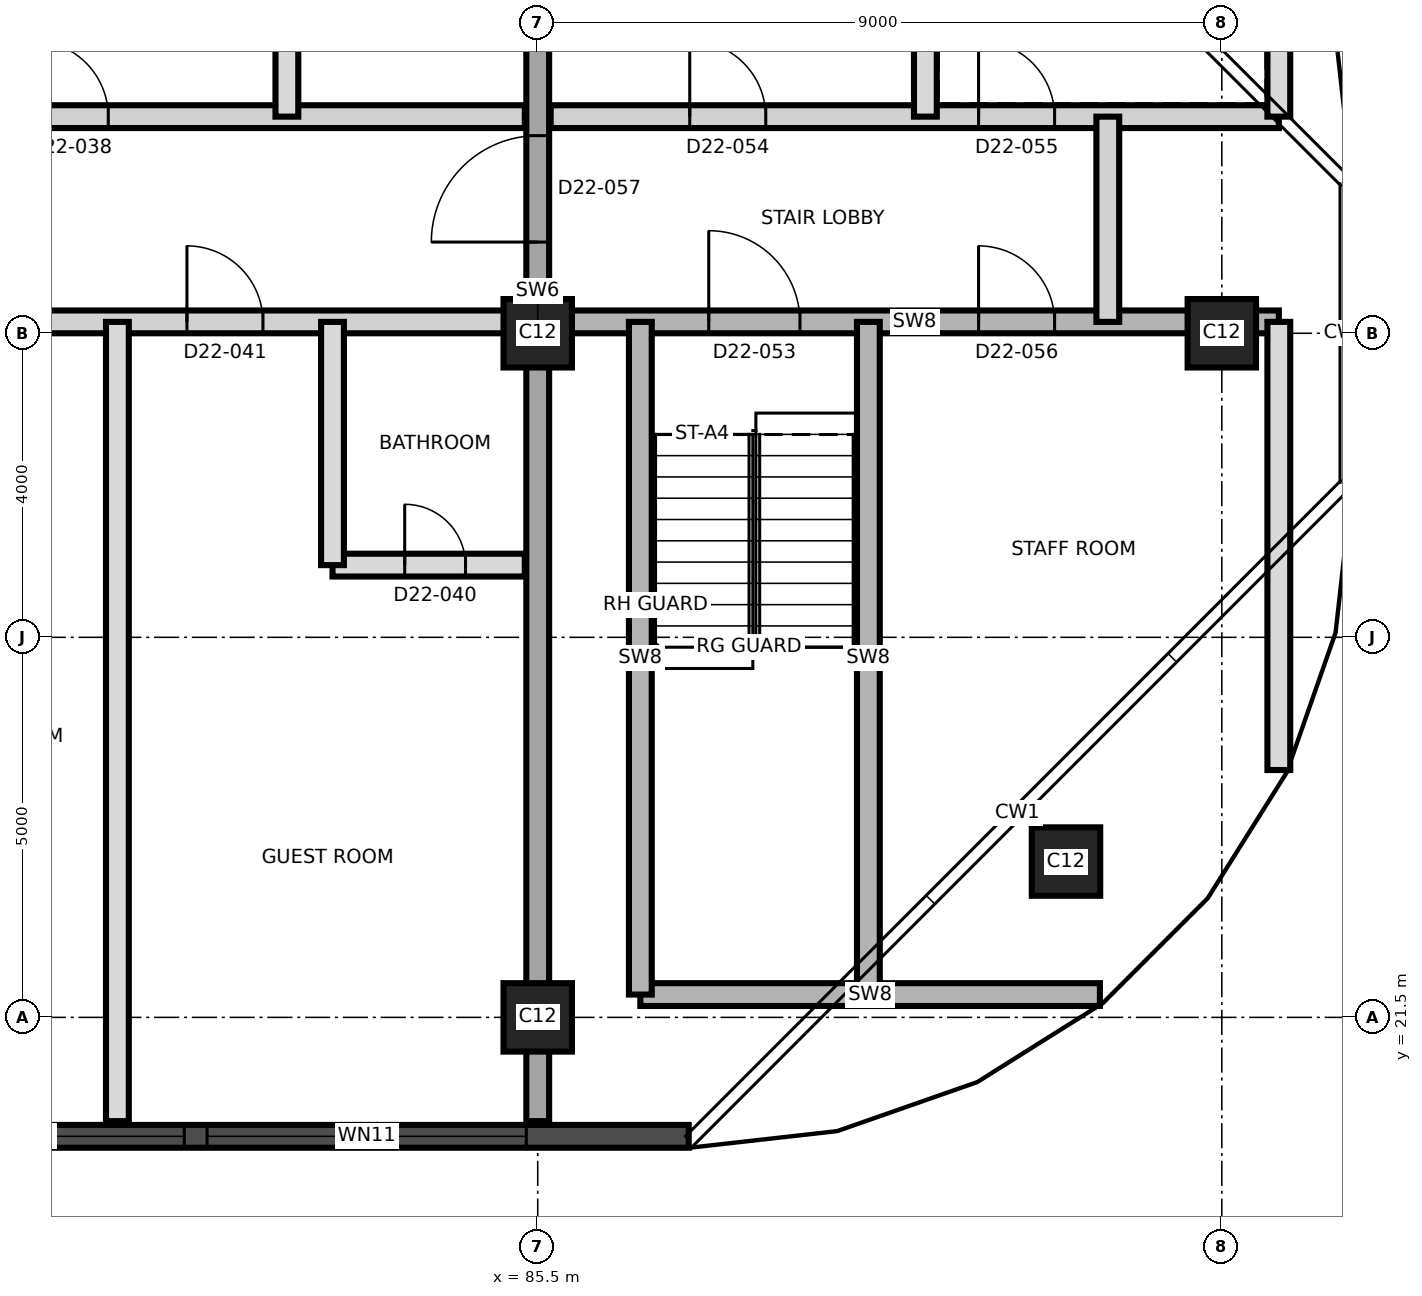
"""IFC4 building model, lengths in metres.
Left out: names, types, materials, properties, quantities, classifications, styles, units other than length and angle.
Written with IfcOpenShell. Run it as: python <this file> out.ifc"""

import sys

from ifc_helpers import new_model, si_unit, direction, frame, frame_2d, origin, origin_2d, place, context, subcontext, project, spatial, rectangle, extrude, element, fill, save


model = new_model("IFC4")
c1 = context("Model", 3, precision=1e-05, world=origin(), true_north=direction((0.0, 1.0)))
c2 = subcontext(c1, "Body", "Model", "MODEL_VIEW")
j1 = project(units=[si_unit("LENGTHUNIT", "METRE"), si_unit("PLANEANGLEUNIT", "RADIAN")], contexts=[c1])
p1 = place(None, origin())
s1 = spatial("IfcSite", under=j1, at=p1, CompositionType="ELEMENT")
p2 = place(p1, origin())
s2 = spatial("IfcBuilding", under=s1, at=p2, CompositionType="ELEMENT")
p3 = place(p2, frame((0.0, 0.0, 199.5)))
s3 = spatial("IfcBuildingStorey", under=s2, at=p3, CompositionType="ELEMENT", Elevation=199.5)
for number, where, z_axis, x_axis in (
    (1, (85.5, 21.5, 0.0), (0.0, 0.0, 1.0), (1.0, 0.0, 0.0)),
    (2, (92.45, 23.55, 0.0), (0.0, 0.0, 1.0), (1.0, 0.0, 0.0)),
    (3, (85.5, 30.5, 0.0), (0.0, 0.0, 1.0), (1.0, 0.0, 0.0)),
    (4, (94.5, 30.5, 0.0), (0.0, 0.0, 1.0), (1.0, 0.0, 0.0)),
):
    element("IfcColumn", number, at=place(p3, frame(where, z_axis=z_axis, x_axis=x_axis)), inside=s3, PredefinedType="COLUMN", context=c2, shape_type="SweptSolid", body=[
        extrude(rectangle(XDim=0.9, YDim=0.9, at=origin_2d()), origin(), (0.0, 0.0, 1.0), 3.7),
    ])
p4 = place(p3, frame((85.5, 20.135, 0.0), z_axis=(0.0, 0.0, 1.0), x_axis=(0.0, 1.0, 0.0)))
e5 = element("IfcWall", 5, at=p4, inside=s3, PredefinedType="SHEAR", context=c2, shape_type="SweptSolid", body=[
    extrude(rectangle(XDim=20.73, YDim=0.3, at=frame_2d((10.365, 0.0))), origin(), (0.0, 0.0, 1.0), 3.7),
])
p5 = place(p4, frame((11.565, 0.0, 0.0)))
e6 = element("IfcOpeningElement", 6, at=p5, cuts=e5, PredefinedType="OPENING", context=c2, shape_type="SweptSolid", body=[
    extrude(rectangle(XDim=1.4, YDim=2.1, at=frame_2d((0.7, 1.05))), frame((0.0, 0.16, 0.0), z_axis=(0.0, -1.0, 0.0), x_axis=(1.0, 0.0, 0.0)), (0.0, 0.0, 1.0), 0.32),
])
p6 = place(p3, frame((44.01, 19.935, 0.0), z_axis=(0.0, 0.0, 1.0), x_axis=(1.0, 0.0, 0.0)))
e7 = element("IfcWall", 7, at=p6, inside=s3, PredefinedType="SOLIDWALL", context=c2, shape_type="SweptSolid", body=[
    extrude(rectangle(XDim=43.477, YDim=0.3, at=frame_2d((21.738, 0.0))), origin(), (0.0, 0.0, 1.0), 3.4),
])
p7 = place(p6, frame((1.845, 0.0, 0.3)))
e8 = element("IfcOpeningElement", 8, at=p7, cuts=e7, PredefinedType="OPENING", context=c2, shape_type="SweptSolid", body=[
    extrude(rectangle(XDim=1.8, YDim=2.4, at=frame_2d((0.9, 1.2))), frame((0.0, 0.16, 0.0), z_axis=(0.0, -1.0, 0.0), x_axis=(1.0, 0.0, 0.0)), (0.0, 0.0, 1.0), 0.32),
])
p8 = place(p6, frame((5.64, 0.0, 0.9)))
e9 = element("IfcOpeningElement", 9, at=p8, cuts=e7, PredefinedType="OPENING", context=c2, shape_type="SweptSolid", body=[
    extrude(rectangle(XDim=4.2, YDim=1.5, at=frame_2d((2.1, 0.75))), frame((0.0, 0.16, 0.0), z_axis=(0.0, -1.0, 0.0), x_axis=(1.0, 0.0, 0.0)), (0.0, 0.0, 1.0), 0.32),
])
p9 = place(p6, frame((10.14, 0.0, 0.9)))
e10 = element("IfcOpeningElement", 10, at=p9, cuts=e7, PredefinedType="OPENING", context=c2, shape_type="SweptSolid", body=[
    extrude(rectangle(XDim=4.2, YDim=1.5, at=frame_2d((2.1, 0.75))), frame((0.0, 0.16, 0.0), z_axis=(0.0, -1.0, 0.0), x_axis=(1.0, 0.0, 0.0)), (0.0, 0.0, 1.0), 0.32),
])
p10 = place(p6, frame((14.64, 0.0, 0.9)))
e11 = element("IfcOpeningElement", 11, at=p10, cuts=e7, PredefinedType="OPENING", context=c2, shape_type="SweptSolid", body=[
    extrude(rectangle(XDim=4.2, YDim=1.5, at=frame_2d((2.1, 0.75))), frame((0.0, 0.16, 0.0), z_axis=(0.0, -1.0, 0.0), x_axis=(1.0, 0.0, 0.0)), (0.0, 0.0, 1.0), 0.32),
])
p11 = place(p6, frame((19.14, 0.0, 0.9)))
e12 = element("IfcOpeningElement", 12, at=p11, cuts=e7, PredefinedType="OPENING", context=c2, shape_type="SweptSolid", body=[
    extrude(rectangle(XDim=4.2, YDim=1.5, at=frame_2d((2.1, 0.75))), frame((0.0, 0.16, 0.0), z_axis=(0.0, -1.0, 0.0), x_axis=(1.0, 0.0, 0.0)), (0.0, 0.0, 1.0), 0.32),
])
p12 = place(p6, frame((23.64, 0.0, 0.9)))
e13 = element("IfcOpeningElement", 13, at=p12, cuts=e7, PredefinedType="OPENING", context=c2, shape_type="SweptSolid", body=[
    extrude(rectangle(XDim=4.2, YDim=1.5, at=frame_2d((2.1, 0.75))), frame((0.0, 0.16, 0.0), z_axis=(0.0, -1.0, 0.0), x_axis=(1.0, 0.0, 0.0)), (0.0, 0.0, 1.0), 0.32),
])
p13 = place(p6, frame((28.14, 0.0, 0.9)))
e14 = element("IfcOpeningElement", 14, at=p13, cuts=e7, PredefinedType="OPENING", context=c2, shape_type="SweptSolid", body=[
    extrude(rectangle(XDim=4.2, YDim=1.5, at=frame_2d((2.1, 0.75))), frame((0.0, 0.16, 0.0), z_axis=(0.0, -1.0, 0.0), x_axis=(1.0, 0.0, 0.0)), (0.0, 0.0, 1.0), 0.32),
])
p14 = place(p6, frame((32.64, 0.0, 0.9)))
e15 = element("IfcOpeningElement", 15, at=p14, cuts=e7, PredefinedType="OPENING", context=c2, shape_type="SweptSolid", body=[
    extrude(rectangle(XDim=4.2, YDim=1.5, at=frame_2d((2.1, 0.75))), frame((0.0, 0.16, 0.0), z_axis=(0.0, -1.0, 0.0), x_axis=(1.0, 0.0, 0.0)), (0.0, 0.0, 1.0), 0.32),
])
p15 = place(p6, frame((37.14, 0.0, 0.9)))
e16 = element("IfcOpeningElement", 16, at=p15, cuts=e7, PredefinedType="OPENING", context=c2, shape_type="SweptSolid", body=[
    extrude(rectangle(XDim=4.2, YDim=1.5, at=frame_2d((2.1, 0.75))), frame((0.0, 0.16, 0.0), z_axis=(0.0, -1.0, 0.0), x_axis=(1.0, 0.0, 0.0)), (0.0, 0.0, 1.0), 0.32),
])
p16 = place(p3, frame((86.85, 21.8, 0.0), z_axis=(0.0, 0.0, 1.0), x_axis=(1.0, 0.0, 0.0)))
e17 = element("IfcWall", 17, at=p16, inside=s3, PredefinedType="SHEAR", context=c2, shape_type="SweptSolid", body=[
    extrude(rectangle(XDim=6.046, YDim=0.3, at=frame_2d((3.023, 0.0))), origin(), (0.0, 0.0, 1.0), 3.4),
])
p17 = place(p3, frame((82.8, 27.45, 0.0), z_axis=(0.0, 0.0, 1.0), x_axis=(1.0, 0.0, 0.0)))
e18 = element("IfcWall", 18, at=p17, inside=s3, PredefinedType="PARTITIONING", context=c2, shape_type="SweptSolid", body=[
    extrude(rectangle(XDim=2.53, YDim=0.3, at=frame_2d((1.265, 0.0))), origin(), (0.0, 0.0, 1.0), 3.4),
])
p18 = place(p17, frame((0.95, 0.0, 0.0)))
e19 = element("IfcOpeningElement", 19, at=p18, cuts=e18, PredefinedType="OPENING", context=c2, shape_type="SweptSolid", body=[
    extrude(rectangle(XDim=0.8, YDim=2.1, at=frame_2d((0.4, 1.05))), frame((0.0, 0.16, 0.0), z_axis=(0.0, -1.0, 0.0), x_axis=(1.0, 0.0, 0.0)), (0.0, 0.0, 1.0), 0.32),
])
p19 = place(p3, frame((58.55, 30.65, 0.0), z_axis=(0.0, 0.0, 1.0), x_axis=(1.0, 0.0, 0.0)))
e20 = element("IfcWall", 20, at=p19, inside=s3, PredefinedType="PARTITIONING", context=c2, shape_type="SweptSolid", body=[
    extrude(rectangle(XDim=26.78, YDim=0.3, at=frame_2d((13.39, 0.0))), origin(), (0.0, 0.0, 1.0), 3.4),
])
p20 = place(p19, frame((1.65, 0.0, 0.0)))
e21 = element("IfcOpeningElement", 21, at=p20, cuts=e20, PredefinedType="OPENING", context=c2, shape_type="SweptSolid", body=[
    extrude(rectangle(XDim=1.2, YDim=2.1, at=frame_2d((0.6, 1.05))), frame((0.0, 0.16, 0.0), z_axis=(0.0, -1.0, 0.0), x_axis=(1.0, 0.0, 0.0)), (0.0, 0.0, 1.0), 0.32),
])
p21 = place(p19, frame((4.9, 0.0, 0.0)))
e22 = element("IfcOpeningElement", 22, at=p21, cuts=e20, PredefinedType="OPENING", context=c2, shape_type="SweptSolid", body=[
    extrude(rectangle(XDim=1.0, YDim=2.1, at=frame_2d((0.5, 1.05))), frame((0.0, 0.16, 0.0), z_axis=(0.0, -1.0, 0.0), x_axis=(1.0, 0.0, 0.0)), (0.0, 0.0, 1.0), 0.32),
])
p22 = place(p19, frame((10.085, 0.0, 0.0)))
e23 = element("IfcOpeningElement", 23, at=p22, cuts=e20, PredefinedType="OPENING", context=c2, shape_type="SweptSolid", body=[
    extrude(rectangle(XDim=1.2, YDim=2.1, at=frame_2d((0.6, 1.05))), frame((0.0, 0.16, 0.0), z_axis=(0.0, -1.0, 0.0), x_axis=(1.0, 0.0, 0.0)), (0.0, 0.0, 1.0), 0.32),
])
p23 = place(p19, frame((13.335, 0.0, 0.0)))
e24 = element("IfcOpeningElement", 24, at=p23, cuts=e20, PredefinedType="OPENING", context=c2, shape_type="SweptSolid", body=[
    extrude(rectangle(XDim=1.0, YDim=2.1, at=frame_2d((0.5, 1.05))), frame((0.0, 0.16, 0.0), z_axis=(0.0, -1.0, 0.0), x_axis=(1.0, 0.0, 0.0)), (0.0, 0.0, 1.0), 0.32),
])
p24 = place(p19, frame((19.085, 0.0, 0.0)))
e25 = element("IfcOpeningElement", 25, at=p24, cuts=e20, PredefinedType="OPENING", context=c2, shape_type="SweptSolid", body=[
    extrude(rectangle(XDim=1.2, YDim=2.1, at=frame_2d((0.6, 1.05))), frame((0.0, 0.16, 0.0), z_axis=(0.0, -1.0, 0.0), x_axis=(1.0, 0.0, 0.0)), (0.0, 0.0, 1.0), 0.32),
])
p25 = place(p19, frame((22.335, 0.0, 0.0)))
e26 = element("IfcOpeningElement", 26, at=p25, cuts=e20, PredefinedType="OPENING", context=c2, shape_type="SweptSolid", body=[
    extrude(rectangle(XDim=1.0, YDim=2.1, at=frame_2d((0.5, 1.05))), frame((0.0, 0.16, 0.0), z_axis=(0.0, -1.0, 0.0), x_axis=(1.0, 0.0, 0.0)), (0.0, 0.0, 1.0), 0.32),
])
p26 = place(p3, frame((85.67, 30.65, 0.0), z_axis=(0.0, 0.0, 1.0), x_axis=(1.0, 0.0, 0.0)))
e27 = element("IfcWall", 27, at=p26, inside=s3, PredefinedType="SHEAR", context=c2, shape_type="SweptSolid", body=[
    extrude(rectangle(XDim=9.58, YDim=0.3, at=frame_2d((4.79, 0.0))), origin(), (0.0, 0.0, 1.0), 3.4),
])
p27 = place(p26, frame((2.08, 0.0, 0.0)))
e28 = element("IfcOpeningElement", 28, at=p27, cuts=e27, PredefinedType="OPENING", context=c2, shape_type="SweptSolid", body=[
    extrude(rectangle(XDim=1.2, YDim=2.1, at=frame_2d((0.6, 1.05))), frame((0.0, 0.16, 0.0), z_axis=(0.0, -1.0, 0.0), x_axis=(1.0, 0.0, 0.0)), (0.0, 0.0, 1.0), 0.32),
])
p28 = place(p26, frame((5.63, 0.0, 0.0)))
e29 = element("IfcOpeningElement", 29, at=p28, cuts=e27, PredefinedType="OPENING", context=c2, shape_type="SweptSolid", body=[
    extrude(rectangle(XDim=1.0, YDim=2.1, at=frame_2d((0.5, 1.05))), frame((0.0, 0.16, 0.0), z_axis=(0.0, -1.0, 0.0), x_axis=(1.0, 0.0, 0.0)), (0.0, 0.0, 1.0), 0.32),
])
p29 = place(p3, frame((58.55, 33.35, 0.0), z_axis=(0.0, 0.0, 1.0), x_axis=(1.0, 0.0, 0.0)))
e30 = element("IfcWall", 30, at=p29, inside=s3, PredefinedType="PARTITIONING", context=c2, shape_type="SweptSolid", body=[
    extrude(rectangle(XDim=26.78, YDim=0.3, at=frame_2d((13.39, 0.0))), origin(), (0.0, 0.0, 1.0), 3.4),
])
p30 = place(p29, frame((1.1, 0.0, 0.0)))
e31 = element("IfcOpeningElement", 31, at=p30, cuts=e30, PredefinedType="OPENING", context=c2, shape_type="SweptSolid", body=[
    extrude(rectangle(XDim=1.0, YDim=2.1, at=frame_2d((0.5, 1.05))), frame((0.0, 0.16, 0.0), z_axis=(0.0, -1.0, 0.0), x_axis=(1.0, 0.0, 0.0)), (0.0, 0.0, 1.0), 0.32),
])
p31 = place(p29, frame((6.95, 0.0, 0.0)))
e32 = element("IfcOpeningElement", 32, at=p31, cuts=e30, PredefinedType="OPENING", context=c2, shape_type="SweptSolid", body=[
    extrude(rectangle(XDim=1.0, YDim=2.1, at=frame_2d((0.5, 1.05))), frame((0.0, 0.16, 0.0), z_axis=(0.0, -1.0, 0.0), x_axis=(1.0, 0.0, 0.0)), (0.0, 0.0, 1.0), 0.32),
])
p32 = place(p29, frame((14.6, 0.0, 0.0)))
e33 = element("IfcOpeningElement", 33, at=p32, cuts=e30, PredefinedType="OPENING", context=c2, shape_type="SweptSolid", body=[
    extrude(rectangle(XDim=1.0, YDim=2.4, at=frame_2d((0.5, 1.2))), frame((0.0, 0.16, 0.0), z_axis=(0.0, -1.0, 0.0), x_axis=(1.0, 0.0, 0.0)), (0.0, 0.0, 1.0), 0.32),
])
p33 = place(p29, frame((20.3, 0.0, 0.0)))
e34 = element("IfcOpeningElement", 34, at=p33, cuts=e30, PredefinedType="OPENING", context=c2, shape_type="SweptSolid", body=[
    extrude(rectangle(XDim=1.0, YDim=2.4, at=frame_2d((0.5, 1.2))), frame((0.0, 0.16, 0.0), z_axis=(0.0, -1.0, 0.0), x_axis=(1.0, 0.0, 0.0)), (0.0, 0.0, 1.0), 0.32),
])
p34 = place(p3, frame((85.67, 33.35, 0.0), z_axis=(0.0, 0.0, 1.0), x_axis=(1.0, 0.0, 0.0)))
e35 = element("IfcWall", 35, at=p34, inside=s3, PredefinedType="PARTITIONING", context=c2, shape_type="SweptSolid", body=[
    extrude(rectangle(XDim=9.58, YDim=0.3, at=frame_2d((4.79, 0.0))), origin(), (0.0, 0.0, 1.0), 3.4),
])
p35 = place(p34, frame((1.83, 0.0, 0.0)))
e36 = element("IfcOpeningElement", 36, at=p35, cuts=e35, PredefinedType="OPENING", context=c2, shape_type="SweptSolid", body=[
    extrude(rectangle(XDim=1.0, YDim=2.1, at=frame_2d((0.5, 1.05))), frame((0.0, 0.16, 0.0), z_axis=(0.0, -1.0, 0.0), x_axis=(1.0, 0.0, 0.0)), (0.0, 0.0, 1.0), 0.32),
])
p36 = place(p34, frame((5.63, 0.0, 0.0)))
e37 = element("IfcOpeningElement", 37, at=p36, cuts=e35, PredefinedType="OPENING", context=c2, shape_type="SweptSolid", body=[
    extrude(rectangle(XDim=1.0, YDim=2.1, at=frame_2d((0.5, 1.05))), frame((0.0, 0.16, 0.0), z_axis=(0.0, -1.0, 0.0), x_axis=(1.0, 0.0, 0.0)), (0.0, 0.0, 1.0), 0.32),
])
p37 = place(p3, frame((79.97, 20.135, 0.0), z_axis=(0.0, 0.0, 1.0), x_axis=(0.0, 1.0, 0.0)))
e38 = element("IfcWall", 38, at=p37, inside=s3, PredefinedType="PARTITIONING", context=c2, shape_type="SweptSolid", body=[
    extrude(rectangle(XDim=10.515, YDim=0.3, at=frame_2d((5.257, 0.0))), origin(), (0.0, 0.0, 1.0), 3.4),
])
p38 = place(p3, frame((82.2, 33.35, 0.0), z_axis=(0.0, 0.0, 1.0), x_axis=(0.0, 1.0, 0.0)))
e39 = element("IfcWall", 39, at=p38, inside=s3, PredefinedType="PARTITIONING", context=c2, shape_type="SweptSolid", body=[
    extrude(rectangle(XDim=3.5, YDim=0.3, at=frame_2d((1.75, 0.0))), origin(), (0.0, 0.0, 1.0), 3.4),
])
p39 = place(p3, frame((82.8, 27.45, 0.0), z_axis=(0.0, 0.0, 1.0), x_axis=(0.0, 1.0, 0.0)))
e40 = element("IfcWall", 40, at=p39, inside=s3, PredefinedType="PARTITIONING", context=c2, shape_type="SweptSolid", body=[
    extrude(rectangle(XDim=3.2, YDim=0.3, at=frame_2d((1.6, 0.0))), origin(), (0.0, 0.0, 1.0), 3.4),
])
for number, where, z_axis, x_axis in (
    (41, (86.85, 21.8, 0.0), (0.0, 0.0, 1.0), (0.0, 1.0, 0.0)),
    (42, (89.85, 21.8, 0.0), (0.0, 0.0, 1.0), (0.0, 1.0, 0.0)),
):
    element("IfcWall", number, at=place(p3, frame(where, z_axis=z_axis, x_axis=x_axis)), inside=s3, PredefinedType="SHEAR", context=c2, shape_type="SweptSolid", body=[
        extrude(rectangle(XDim=8.85, YDim=0.3, at=frame_2d((4.425, 0.0))), origin(), (0.0, 0.0, 1.0), 3.4),
    ])
p40 = place(p3, frame((90.6, 33.35, 0.0), z_axis=(0.0, 0.0, 1.0), x_axis=(0.0, 1.0, 0.0)))
e43 = element("IfcWall", 43, at=p40, inside=s3, PredefinedType="PARTITIONING", context=c2, shape_type="SweptSolid", body=[
    extrude(rectangle(XDim=7.124, YDim=0.3, at=frame_2d((3.562, 0.0))), origin(), (0.0, 0.0, 1.0), 3.4),
])
p41 = place(p3, frame((93.0, 30.65, 0.0), z_axis=(0.0, 0.0, 1.0), x_axis=(0.0, 1.0, 0.0)))
e44 = element("IfcWall", 44, at=p41, inside=s3, PredefinedType="PARTITIONING", context=c2, shape_type="SweptSolid", body=[
    extrude(rectangle(XDim=2.7, YDim=0.3, at=frame_2d((1.35, 0.0))), origin(), (0.0, 0.0, 1.0), 3.4),
])
p42 = place(p3, frame((95.25, 24.754, 0.0), z_axis=(0.0, 0.0, 1.0), x_axis=(0.0, 1.0, 0.0)))
e45 = element("IfcWall", 45, at=p42, inside=s3, PredefinedType="PARTITIONING", context=c2, shape_type="SweptSolid", body=[
    extrude(rectangle(XDim=5.896, YDim=0.3, at=frame_2d((2.948, 0.0))), origin(), (0.0, 0.0, 1.0), 3.4),
])
p43 = place(p3, frame((95.25, 33.35, 0.0), z_axis=(0.0, 0.0, 1.0), x_axis=(0.0, 1.0, 0.0)))
e46 = element("IfcWall", 46, at=p43, inside=s3, PredefinedType="PARTITIONING", context=c2, shape_type="SweptSolid", body=[
    extrude(rectangle(XDim=2.896, YDim=0.3, at=frame_2d((1.448, 0.0))), origin(), (0.0, 0.0, 1.0), 3.4),
])
p44 = place(p14, origin())
e47 = element("IfcWindow", 47, at=p44, inside=s3, PartitioningType="SINGLE_PANEL", PredefinedType="WINDOW", context=c2, shape_type="SweptSolid", body=[
    extrude(rectangle(XDim=4.2, YDim=1.5, at=frame_2d((2.1, 0.75))), frame((0.0, 0.03, 0.0), z_axis=(0.0, -1.0, 0.0), x_axis=(1.0, 0.0, 0.0)), (0.0, 0.0, 1.0), 0.06),
])
fill(e15, e47)
p45 = place(p15, origin())
e48 = element("IfcWindow", 48, at=p45, inside=s3, PartitioningType="SINGLE_PANEL", PredefinedType="WINDOW", context=c2, shape_type="SweptSolid", body=[
    extrude(rectangle(XDim=4.2, YDim=1.5, at=frame_2d((2.1, 0.75))), frame((0.0, 0.03, 0.0), z_axis=(0.0, -1.0, 0.0), x_axis=(1.0, 0.0, 0.0)), (0.0, 0.0, 1.0), 0.06),
])
fill(e16, e48)
p46 = place(p33, origin())
e49 = element("IfcDoor", 49, at=p46, inside=s3, OperationType="SINGLE_SWING_RIGHT", PredefinedType="DOOR", context=c2, shape_type="SweptSolid", body=[
    extrude(rectangle(XDim=1.0, YDim=2.4, at=frame_2d((0.5, 1.2))), frame((0.0, 0.025, 0.0), z_axis=(0.0, -1.0, 0.0), x_axis=(1.0, 0.0, 0.0)), (0.0, 0.0, 1.0), 0.05),
])
fill(e34, e49)
p47 = place(p18, origin())
e50 = element("IfcDoor", 50, at=p47, inside=s3, OperationType="SINGLE_SWING_LEFT", PredefinedType="DOOR", context=c2, shape_type="SweptSolid", body=[
    extrude(rectangle(XDim=0.8, YDim=2.1, at=frame_2d((0.4, 1.05))), frame((0.0, 0.025, 0.0), z_axis=(0.0, -1.0, 0.0), x_axis=(1.0, 0.0, 0.0)), (0.0, 0.0, 1.0), 0.05),
])
fill(e19, e50)
p48 = place(p25, origin())
e51 = element("IfcDoor", 51, at=p48, inside=s3, OperationType="SINGLE_SWING_RIGHT", PredefinedType="DOOR", context=c2, shape_type="SweptSolid", body=[
    extrude(rectangle(XDim=1.0, YDim=2.1, at=frame_2d((0.5, 1.05))), frame((0.0, 0.025, 0.0), z_axis=(0.0, -1.0, 0.0), x_axis=(1.0, 0.0, 0.0)), (0.0, 0.0, 1.0), 0.05),
])
fill(e26, e51)
p49 = place(p27, origin())
e52 = element("IfcDoor", 52, at=p49, inside=s3, OperationType="SINGLE_SWING_LEFT", PredefinedType="DOOR", context=c2, shape_type="SweptSolid", body=[
    extrude(rectangle(XDim=1.2, YDim=2.1, at=frame_2d((0.6, 1.05))), frame((0.0, 0.025, 0.0), z_axis=(0.0, -1.0, 0.0), x_axis=(1.0, 0.0, 0.0)), (0.0, 0.0, 1.0), 0.05),
])
fill(e28, e52)
p50 = place(p35, origin())
e53 = element("IfcDoor", 53, at=p50, inside=s3, OperationType="SINGLE_SWING_LEFT", PredefinedType="DOOR", context=c2, shape_type="SweptSolid", body=[
    extrude(rectangle(XDim=1.0, YDim=2.1, at=frame_2d((0.5, 1.05))), frame((0.0, 0.025, 0.0), z_axis=(0.0, -1.0, 0.0), x_axis=(1.0, 0.0, 0.0)), (0.0, 0.0, 1.0), 0.05),
])
fill(e36, e53)
p51 = place(p36, origin())
e54 = element("IfcDoor", 54, at=p51, inside=s3, OperationType="SINGLE_SWING_RIGHT", PredefinedType="DOOR", context=c2, shape_type="SweptSolid", body=[
    extrude(rectangle(XDim=1.0, YDim=2.1, at=frame_2d((0.5, 1.05))), frame((0.0, 0.025, 0.0), z_axis=(0.0, -1.0, 0.0), x_axis=(1.0, 0.0, 0.0)), (0.0, 0.0, 1.0), 0.05),
])
fill(e37, e54)
p52 = place(p28, origin())
e55 = element("IfcDoor", 55, at=p52, inside=s3, OperationType="SINGLE_SWING_LEFT", PredefinedType="DOOR", context=c2, shape_type="SweptSolid", body=[
    extrude(rectangle(XDim=1.0, YDim=2.1, at=frame_2d((0.5, 1.05))), frame((0.0, 0.025, 0.0), z_axis=(0.0, -1.0, 0.0), x_axis=(1.0, 0.0, 0.0)), (0.0, 0.0, 1.0), 0.05),
])
fill(e29, e55)
p53 = place(p5, origin())
e56 = element("IfcDoor", 56, at=p53, inside=s3, OperationType="SINGLE_SWING_RIGHT", PredefinedType="DOOR", context=c2, shape_type="SweptSolid", body=[
    extrude(rectangle(XDim=1.4, YDim=2.1, at=frame_2d((0.7, 1.05))), frame((0.0, 0.025, 0.0), z_axis=(0.0, -1.0, 0.0), x_axis=(1.0, 0.0, 0.0)), (0.0, 0.0, 1.0), 0.05),
])
fill(e6, e56)
save(model, sys.argv[1])
